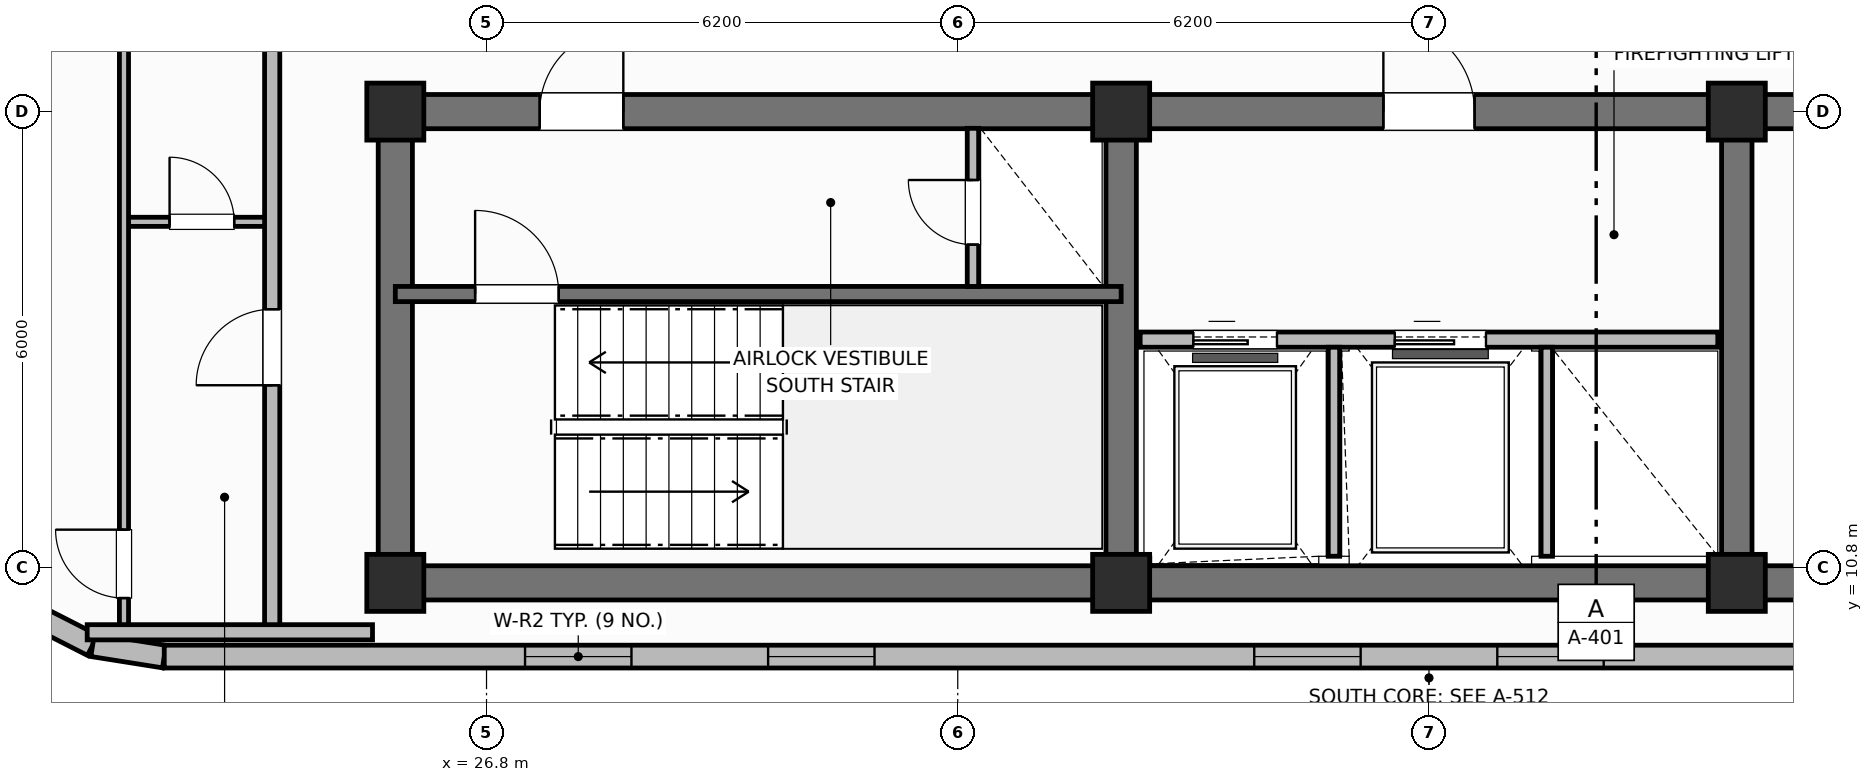
"""IFC4 building model, lengths in metres.
Left out: names, types, materials, properties, quantities, classifications, styles, units other than length and angle.
Written with IfcOpenShell. Run it as: python <this file> out.ifc"""

import sys

from ifc_helpers import new_model, si_unit, direction, frame, frame_2d, origin, origin_2d, place, context, subcontext, project, spatial, rectangle, extrude, element, fill, save


model = new_model("IFC4")
c1 = context("Model", 3, precision=1e-05, world=origin(), true_north=direction((0.0, 1.0)))
c2 = subcontext(c1, "Body", "Model", "MODEL_VIEW")
j1 = project(units=[si_unit("LENGTHUNIT", "METRE"), si_unit("PLANEANGLEUNIT", "RADIAN")], contexts=[c1])
p1 = place(None, origin())
s1 = spatial("IfcSite", under=j1, at=p1, CompositionType="ELEMENT")
p2 = place(p1, origin())
s2 = spatial("IfcBuilding", under=s1, at=p2, CompositionType="ELEMENT")
p3 = place(p2, frame((0.0, 0.0, 286.1)))
s3 = spatial("IfcBuildingStorey", under=s2, at=p3, CompositionType="ELEMENT", Elevation=286.1)
p4 = place(p3, frame((52.8, 10.6, 0.0), z_axis=(0.0, 0.0, 1.0), x_axis=(-1.0, 0.0, 0.0)))
e1 = element("IfcWall", 1, at=p4, inside=s3, PredefinedType="SHEAR", context=c2, shape_type="SweptSolid", body=[
    extrude(rectangle(XDim=27.2, YDim=0.45, at=frame_2d((13.6, 0.0))), origin(), (0.0, 0.0, 1.0), 3.7),
])
p5 = place(p3, frame((25.6, 10.825, 0.0), z_axis=(0.0, 0.0, 1.0), x_axis=(0.0, 1.0, 0.0)))
e2 = element("IfcWall", 2, at=p5, inside=s3, PredefinedType="SHEAR", context=c2, shape_type="SweptSolid", body=[
    extrude(rectangle(XDim=5.75, YDim=0.45, at=frame_2d((2.875, 0.0))), origin(), (0.0, 0.0, 1.0), 3.7),
])
p6 = place(p3, frame((25.6, 16.8, 0.0), z_axis=(0.0, 0.0, 1.0), x_axis=(1.0, 0.0, 0.0)))
e3 = element("IfcWall", 3, at=p6, inside=s3, PredefinedType="SHEAR", context=c2, shape_type="SweptSolid", body=[
    extrude(rectangle(XDim=27.2, YDim=0.45, at=frame_2d((13.6, 0.0))), origin(), (0.0, 0.0, 1.0), 3.7),
])
p7 = place(p6, frame((1.9, 0.0, 0.0)))
e4 = element("IfcOpeningElement", 4, at=p7, cuts=e3, PredefinedType="OPENING", context=c2, shape_type="SweptSolid", body=[
    extrude(rectangle(XDim=1.1, YDim=2.15, at=frame_2d((0.55, 1.075))), frame((0.0, 0.235, 0.0), z_axis=(0.0, -1.0, 0.0), x_axis=(1.0, 0.0, 0.0)), (0.0, 0.0, 1.0), 0.47),
])
p8 = place(p6, frame((13.0, 0.0, 0.0)))
e5 = element("IfcOpeningElement", 5, at=p8, cuts=e3, PredefinedType="OPENING", context=c2, shape_type="SweptSolid", body=[
    extrude(rectangle(XDim=1.2, YDim=2.15, at=frame_2d((0.6, 1.075))), frame((0.0, 0.235, 0.0), z_axis=(0.0, -1.0, 0.0), x_axis=(1.0, 0.0, 0.0)), (0.0, 0.0, 1.0), 0.47),
])
p9 = place(p6, frame((21.6, 0.0, 0.0)))
e6 = element("IfcOpeningElement", 6, at=p9, cuts=e3, PredefinedType="OPENING", context=c2, shape_type="SweptSolid", body=[
    extrude(rectangle(XDim=1.0, YDim=2.15, at=frame_2d((0.5, 1.075))), frame((0.0, 0.235, 0.0), z_axis=(0.0, -1.0, 0.0), x_axis=(1.0, 0.0, 0.0)), (0.0, 0.0, 1.0), 0.47),
])
for number, where, z_axis, x_axis in (
    (7, (35.15, 10.825, 0.0), (0.0, 0.0, 1.0), (0.0, 1.0, 0.0)),
    (8, (43.25, 10.825, 0.0), (0.0, 0.0, 1.0), (0.0, 1.0, 0.0)),
):
    element("IfcWall", number, at=place(p3, frame(where, z_axis=z_axis, x_axis=x_axis)), inside=s3, PredefinedType="SHEAR", context=c2, shape_type="SweptSolid", body=[
        extrude(rectangle(XDim=5.75, YDim=0.4, at=frame_2d((2.875, 0.0))), origin(), (0.0, 0.0, 1.0), 3.7),
    ])
for number, where, z_axis, x_axis in (
    (9, (25.6, 10.6, 0.0), (0.0, 0.0, 1.0), (1.0, 0.0, 0.0)),
    (10, (25.6, 16.8, 0.0), (0.0, 0.0, 1.0), (1.0, 0.0, 0.0)),
    (11, (35.15, 10.6, 0.0), (0.0, 0.0, 1.0), (1.0, 0.0, 0.0)),
    (12, (35.15, 16.8, 0.0), (0.0, 0.0, 1.0), (1.0, 0.0, 0.0)),
    (13, (43.25, 10.6, 0.0), (0.0, 0.0, 1.0), (1.0, 0.0, 0.0)),
    (14, (43.25, 16.8, 0.0), (0.0, 0.0, 1.0), (1.0, 0.0, 0.0)),
):
    element("IfcColumn", number, at=place(p3, frame(where, z_axis=z_axis, x_axis=x_axis)), inside=s3, PredefinedType="COLUMN", context=c2, shape_type="SweptSolid", body=[
        extrude(rectangle(XDim=0.75, YDim=0.75, at=origin_2d()), origin(), (0.0, 0.0, 1.0), 3.7),
    ])
p10 = place(p3, frame((20.767, 10.212, 0.0), z_axis=(0.0, 0.0, 1.0), x_axis=(0.891023873617, -0.45395644796, 0.0)))
e15 = element("IfcWall", 15, at=p10, inside=s3, PredefinedType="SOLIDWALL", context=c2, shape_type="SweptSolid", body=[
    extrude(rectangle(XDim=0.954, YDim=0.3, at=frame_2d((0.477, 0.0))), origin(), (0.0, 0.0, 1.0), 2.73),
])
p11 = place(p3, frame((21.617, 9.779, 0.0), z_axis=(0.0, 0.0, 1.0), x_axis=(0.987669453596, -0.156553666304, 0.0)))
e16 = element("IfcWall", 16, at=p11, inside=s3, PredefinedType="SOLIDWALL", context=c2, shape_type="SweptSolid", body=[
    extrude(rectangle(XDim=0.954, YDim=0.3, at=frame_2d((0.477, 0.0))), origin(), (0.0, 0.0, 1.0), 2.73),
])
p12 = place(p3, frame((22.56, 9.63, 0.0), z_axis=(0.0, 0.0, 1.0), x_axis=(1.0, 0.0, 0.0)))
e17 = element("IfcWall", 17, at=p12, inside=s3, PredefinedType="SOLIDWALL", context=c2, shape_type="SweptSolid", body=[
    extrude(rectangle(XDim=33.28, YDim=0.3, at=frame_2d((16.64, 0.0))), origin(), (0.0, 0.0, 1.0), 2.73),
])
p13 = place(p12, frame((4.747, 0.0, 0.76)))
e18 = element("IfcOpeningElement", 18, at=p13, cuts=e17, PredefinedType="OPENING", context=c2, shape_type="SweptSolid", body=[
    extrude(rectangle(XDim=1.4, YDim=1.85, at=frame_2d((0.7, 0.925))), frame((0.0, 0.16, 0.0), z_axis=(0.0, -1.0, 0.0), x_axis=(1.0, 0.0, 0.0)), (0.0, 0.0, 1.0), 0.32),
])
p14 = place(p12, frame((7.945, 0.0, 0.76)))
e19 = element("IfcOpeningElement", 19, at=p14, cuts=e17, PredefinedType="OPENING", context=c2, shape_type="SweptSolid", body=[
    extrude(rectangle(XDim=1.4, YDim=1.85, at=frame_2d((0.7, 0.925))), frame((0.0, 0.16, 0.0), z_axis=(0.0, -1.0, 0.0), x_axis=(1.0, 0.0, 0.0)), (0.0, 0.0, 1.0), 0.32),
])
p15 = place(p12, frame((14.341, 0.0, 0.76)))
e20 = element("IfcOpeningElement", 20, at=p15, cuts=e17, PredefinedType="OPENING", context=c2, shape_type="SweptSolid", body=[
    extrude(rectangle(XDim=1.4, YDim=1.85, at=frame_2d((0.7, 0.925))), frame((0.0, 0.16, 0.0), z_axis=(0.0, -1.0, 0.0), x_axis=(1.0, 0.0, 0.0)), (0.0, 0.0, 1.0), 0.32),
])
p16 = place(p12, frame((17.539, 0.0, 0.76)))
e21 = element("IfcOpeningElement", 21, at=p16, cuts=e17, PredefinedType="OPENING", context=c2, shape_type="SweptSolid", body=[
    extrude(rectangle(XDim=1.4, YDim=1.85, at=frame_2d((0.7, 0.925))), frame((0.0, 0.16, 0.0), z_axis=(0.0, -1.0, 0.0), x_axis=(1.0, 0.0, 0.0)), (0.0, 0.0, 1.0), 0.32),
])
p17 = place(p12, frame((23.935, 0.0, 0.76)))
e22 = element("IfcOpeningElement", 22, at=p17, cuts=e17, PredefinedType="OPENING", context=c2, shape_type="SweptSolid", body=[
    extrude(rectangle(XDim=1.4, YDim=1.85, at=frame_2d((0.7, 0.925))), frame((0.0, 0.16, 0.0), z_axis=(0.0, -1.0, 0.0), x_axis=(1.0, 0.0, 0.0)), (0.0, 0.0, 1.0), 0.32),
])
p18 = place(p12, frame((27.133, 0.0, 0.76)))
e23 = element("IfcOpeningElement", 23, at=p18, cuts=e17, PredefinedType="OPENING", context=c2, shape_type="SweptSolid", body=[
    extrude(rectangle(XDim=1.4, YDim=1.85, at=frame_2d((0.7, 0.925))), frame((0.0, 0.16, 0.0), z_axis=(0.0, -1.0, 0.0), x_axis=(1.0, 0.0, 0.0)), (0.0, 0.0, 1.0), 0.32),
])
p19 = place(p3, frame((25.6, 14.4, 0.0), z_axis=(0.0, 0.0, 1.0), x_axis=(1.0, 0.0, 0.0)))
e24 = element("IfcWall", 24, at=p19, inside=s3, PredefinedType="SHEAR", context=c2, shape_type="SweptSolid", body=[
    extrude(rectangle(XDim=9.55, YDim=0.2, at=frame_2d((4.775, 0.0))), origin(), (0.0, 0.0, 1.0), 3.7),
])
p20 = place(p19, frame((1.05, 0.0, 0.0)))
e25 = element("IfcOpeningElement", 25, at=p20, cuts=e24, PredefinedType="OPENING", context=c2, shape_type="SweptSolid", body=[
    extrude(rectangle(XDim=1.1, YDim=2.15, at=frame_2d((0.55, 1.075))), frame((0.0, 0.11, 0.0), z_axis=(0.0, -1.0, 0.0), x_axis=(1.0, 0.0, 0.0)), (0.0, 0.0, 1.0), 0.22),
])
p21 = place(p3, frame((33.2, 14.5, 0.0), z_axis=(0.0, 0.0, 1.0), x_axis=(0.0, 1.0, 0.0)))
e26 = element("IfcWall", 26, at=p21, inside=s3, PredefinedType="PARTITIONING", context=c2, shape_type="SweptSolid", body=[
    extrude(rectangle(XDim=2.08, YDim=0.15, at=frame_2d((1.04, 0.0))), origin(), (0.0, 0.0, 1.0), 2.56),
])
p22 = place(p21, frame((0.55, 0.0, 0.0)))
e27 = element("IfcOpeningElement", 27, at=p22, cuts=e26, PredefinedType="OPENING", context=c2, shape_type="SweptSolid", body=[
    extrude(rectangle(XDim=0.85, YDim=2.05, at=frame_2d((0.425, 1.025))), frame((0.0, 0.085, 0.0), z_axis=(0.0, -1.0, 0.0), x_axis=(1.0, 0.0, 0.0)), (0.0, 0.0, 1.0), 0.17),
])
p23 = place(p3, frame((35.4, 13.8, 0.0), z_axis=(0.0, 0.0, 1.0), x_axis=(1.0, 0.0, 0.0)))
e28 = element("IfcWall", 28, at=p23, inside=s3, PredefinedType="PARTITIONING", context=c2, shape_type="SweptSolid", body=[
    extrude(rectangle(XDim=7.6, YDim=0.2, at=frame_2d((3.8, 0.0))), origin(), (0.0, 0.0, 1.0), 2.33),
])
p24 = place(p23, frame((0.7, 0.0, 0.0)))
e29 = element("IfcOpeningElement", 29, at=p24, cuts=e28, PredefinedType="OPENING", context=c2, shape_type="SweptSolid", body=[
    extrude(rectangle(XDim=1.1, YDim=2.15, at=frame_2d((0.55, 1.075))), frame((0.0, 0.11, 0.0), z_axis=(0.0, -1.0, 0.0), x_axis=(1.0, 0.0, 0.0)), (0.0, 0.0, 1.0), 0.22),
])
p25 = place(p23, frame((3.35, 0.0, 0.0)))
e30 = element("IfcOpeningElement", 30, at=p25, cuts=e28, PredefinedType="OPENING", context=c2, shape_type="SweptSolid", body=[
    extrude(rectangle(XDim=1.2, YDim=2.15, at=frame_2d((0.6, 1.075))), frame((0.0, 0.11, 0.0), z_axis=(0.0, -1.0, 0.0), x_axis=(1.0, 0.0, 0.0)), (0.0, 0.0, 1.0), 0.22),
])
for number, where, z_axis, x_axis in (
    (31, (37.95, 10.95, 0.0), (0.0, 0.0, 1.0), (0.0, 1.0, 0.0)),
    (32, (40.75, 10.95, 0.0), (0.0, 0.0, 1.0), (0.0, 1.0, 0.0)),
):
    element("IfcWall", number, at=place(p3, frame(where, z_axis=z_axis, x_axis=x_axis)), inside=s3, PredefinedType="PARTITIONING", context=c2, shape_type="SweptSolid", body=[
        extrude(rectangle(XDim=2.75, YDim=0.15, at=frame_2d((1.375, 0.0))), origin(), (0.0, 0.0, 1.0), 2.56),
    ])
p26 = place(p3, frame((22.03, 15.35, 0.0), z_axis=(0.0, 0.0, 1.0), x_axis=(1.0, 0.0, 0.0)))
e33 = element("IfcWall", 33, at=p26, inside=s3, PredefinedType="PARTITIONING", context=c2, shape_type="SweptSolid", body=[
    extrude(rectangle(XDim=1.95, YDim=0.12, at=frame_2d((0.975, 0.0))), origin(), (0.0, 0.0, 1.0), 2.56),
])
p27 = place(p26, frame((0.6, 0.0, 0.0)))
e34 = element("IfcOpeningElement", 34, at=p27, cuts=e33, PredefinedType="OPENING", context=c2, shape_type="SweptSolid", body=[
    extrude(rectangle(XDim=0.85, YDim=2.1, at=frame_2d((0.425, 1.05))), frame((0.0, 0.07, 0.0), z_axis=(0.0, -1.0, 0.0), x_axis=(1.0, 0.0, 0.0)), (0.0, 0.0, 1.0), 0.14),
])
p28 = place(p3, frame((22.03, 9.99, 0.0), z_axis=(0.0, 0.0, 1.0), x_axis=(0.0, 1.0, 0.0)))
e35 = element("IfcWall", 35, at=p28, inside=s3, PredefinedType="PARTITIONING", context=c2, shape_type="SweptSolid", body=[
    extrude(rectangle(XDim=12.67, YDim=0.12, at=frame_2d((6.335, 0.0))), origin(), (0.0, 0.0, 1.0), 2.56),
])
p29 = place(p28, frame((0.41, 0.0, 0.0)))
e36 = element("IfcOpeningElement", 36, at=p29, cuts=e35, PredefinedType="OPENING", context=c2, shape_type="SweptSolid", body=[
    extrude(rectangle(XDim=0.9, YDim=2.1, at=frame_2d((0.45, 1.05))), frame((0.0, 0.07, 0.0), z_axis=(0.0, -1.0, 0.0), x_axis=(1.0, 0.0, 0.0)), (0.0, 0.0, 1.0), 0.14),
])
p30 = place(p28, frame((10.51, 0.0, 0.0)))
e37 = element("IfcOpeningElement", 37, at=p30, cuts=e35, PredefinedType="OPENING", context=c2, shape_type="SweptSolid", body=[
    extrude(rectangle(XDim=0.82, YDim=2.08, at=frame_2d((0.41, 1.04))), frame((0.0, 0.07, 0.0), z_axis=(0.0, -1.0, 0.0), x_axis=(1.0, 0.0, 0.0)), (0.0, 0.0, 1.0), 0.14),
])
p31 = place(p3, frame((23.98, 9.95, 0.0), z_axis=(0.0, 0.0, 1.0), x_axis=(0.0, 1.0, 0.0)))
e38 = element("IfcWall", 38, at=p31, inside=s3, PredefinedType="PARTITIONING", context=c2, shape_type="SweptSolid", body=[
    extrude(rectangle(XDim=36.5, YDim=0.2, at=frame_2d((18.25, 0.0))), origin(), (0.0, 0.0, 1.0), 2.56),
])
p32 = place(p31, frame((3.25, 0.0, 0.0)))
e39 = element("IfcOpeningElement", 39, at=p32, cuts=e38, PredefinedType="OPENING", context=c2, shape_type="SweptSolid", body=[
    extrude(rectangle(XDim=1.0, YDim=2.15, at=frame_2d((0.5, 1.075))), frame((0.0, 0.11, 0.0), z_axis=(0.0, -1.0, 0.0), x_axis=(1.0, 0.0, 0.0)), (0.0, 0.0, 1.0), 0.22),
])
p33 = place(p31, frame((13.3, 0.0, 0.0)))
e40 = element("IfcOpeningElement", 40, at=p33, cuts=e38, PredefinedType="OPENING", context=c2, shape_type="SweptSolid", body=[
    extrude(rectangle(XDim=1.0, YDim=2.15, at=frame_2d((0.5, 1.075))), frame((0.0, 0.11, 0.0), z_axis=(0.0, -1.0, 0.0), x_axis=(1.0, 0.0, 0.0)), (0.0, 0.0, 1.0), 0.22),
])
p34 = place(p31, frame((25.005, 0.0, 0.0)))
e41 = element("IfcOpeningElement", 41, at=p34, cuts=e38, PredefinedType="OPENING", context=c2, shape_type="SweptSolid", body=[
    extrude(rectangle(XDim=1.0, YDim=2.15, at=frame_2d((0.5, 1.075))), frame((0.0, 0.11, 0.0), z_axis=(0.0, -1.0, 0.0), x_axis=(1.0, 0.0, 0.0)), (0.0, 0.0, 1.0), 0.22),
])
p35 = place(p3, frame((21.546, 9.95, 0.0), z_axis=(0.0, 0.0, 1.0), x_axis=(1.0, 0.0, 0.0)))
e42 = element("IfcWall", 42, at=p35, inside=s3, PredefinedType="PARTITIONING", context=c2, shape_type="SweptSolid", body=[
    extrude(rectangle(XDim=3.754, YDim=0.2, at=frame_2d((1.877, 0.0))), origin(), (0.0, 0.0, 1.0), 2.56),
])
p36 = place(p13, origin())
e43 = element("IfcWindow", 43, at=p36, inside=s3, PartitioningType="SINGLE_PANEL", PredefinedType="WINDOW", context=c2, shape_type="SweptSolid", body=[
    extrude(rectangle(XDim=1.4, YDim=1.85, at=frame_2d((0.7, 0.925))), frame((0.0, 0.03, 0.0), z_axis=(0.0, -1.0, 0.0), x_axis=(1.0, 0.0, 0.0)), (0.0, 0.0, 1.0), 0.06),
])
fill(e18, e43)
p37 = place(p14, origin())
e44 = element("IfcWindow", 44, at=p37, inside=s3, PartitioningType="SINGLE_PANEL", PredefinedType="WINDOW", context=c2, shape_type="SweptSolid", body=[
    extrude(rectangle(XDim=1.4, YDim=1.85, at=frame_2d((0.7, 0.925))), frame((0.0, 0.03, 0.0), z_axis=(0.0, -1.0, 0.0), x_axis=(1.0, 0.0, 0.0)), (0.0, 0.0, 1.0), 0.06),
])
fill(e19, e44)
p38 = place(p15, origin())
e45 = element("IfcWindow", 45, at=p38, inside=s3, PartitioningType="SINGLE_PANEL", PredefinedType="WINDOW", context=c2, shape_type="SweptSolid", body=[
    extrude(rectangle(XDim=1.4, YDim=1.85, at=frame_2d((0.7, 0.925))), frame((0.0, 0.03, 0.0), z_axis=(0.0, -1.0, 0.0), x_axis=(1.0, 0.0, 0.0)), (0.0, 0.0, 1.0), 0.06),
])
fill(e20, e45)
p39 = place(p16, origin())
e46 = element("IfcWindow", 46, at=p39, inside=s3, PartitioningType="SINGLE_PANEL", PredefinedType="WINDOW", context=c2, shape_type="SweptSolid", body=[
    extrude(rectangle(XDim=1.4, YDim=1.85, at=frame_2d((0.7, 0.925))), frame((0.0, 0.03, 0.0), z_axis=(0.0, -1.0, 0.0), x_axis=(1.0, 0.0, 0.0)), (0.0, 0.0, 1.0), 0.06),
])
fill(e21, e46)
p40 = place(p20, origin())
e47 = element("IfcDoor", 47, at=p40, inside=s3, OperationType="SINGLE_SWING_LEFT", PredefinedType="DOOR", context=c2, shape_type="SweptSolid", body=[
    extrude(rectangle(XDim=1.1, YDim=2.15, at=frame_2d((0.55, 1.075))), frame((0.0, 0.025, 0.0), z_axis=(0.0, -1.0, 0.0), x_axis=(1.0, 0.0, 0.0)), (0.0, 0.0, 1.0), 0.05),
])
fill(e25, e47)
p41 = place(p22, origin())
e48 = element("IfcDoor", 48, at=p41, inside=s3, OperationType="SINGLE_SWING_RIGHT", PredefinedType="TRAPDOOR", context=c2, shape_type="SweptSolid", body=[
    extrude(rectangle(XDim=0.85, YDim=2.05, at=frame_2d((0.425, 1.025))), frame((0.0, 0.025, 0.0), z_axis=(0.0, -1.0, 0.0), x_axis=(1.0, 0.0, 0.0)), (0.0, 0.0, 1.0), 0.05),
])
fill(e27, e48)
p42 = place(p24, origin())
e49 = element("IfcDoor", 49, at=p42, inside=s3, OperationType="SLIDING_TO_LEFT", PredefinedType="DOOR", context=c2, shape_type="SweptSolid", body=[
    extrude(rectangle(XDim=1.1, YDim=2.15, at=frame_2d((0.55, 1.075))), frame((0.0, 0.025, 0.0), z_axis=(0.0, -1.0, 0.0), x_axis=(1.0, 0.0, 0.0)), (0.0, 0.0, 1.0), 0.05),
])
fill(e29, e49)
p43 = place(p25, origin())
e50 = element("IfcDoor", 50, at=p43, inside=s3, OperationType="SLIDING_TO_LEFT", PredefinedType="DOOR", context=c2, shape_type="SweptSolid", body=[
    extrude(rectangle(XDim=1.2, YDim=2.15, at=frame_2d((0.6, 1.075))), frame((0.0, 0.025, 0.0), z_axis=(0.0, -1.0, 0.0), x_axis=(1.0, 0.0, 0.0)), (0.0, 0.0, 1.0), 0.05),
])
fill(e30, e50)
p44 = place(p27, origin())
e51 = element("IfcDoor", 51, at=p44, inside=s3, OperationType="SINGLE_SWING_LEFT", PredefinedType="DOOR", context=c2, shape_type="SweptSolid", body=[
    extrude(rectangle(XDim=0.85, YDim=2.1, at=frame_2d((0.425, 1.05))), frame((0.0, 0.025, 0.0), z_axis=(0.0, -1.0, 0.0), x_axis=(1.0, 0.0, 0.0)), (0.0, 0.0, 1.0), 0.05),
])
fill(e34, e51)
p45 = place(p29, origin())
e52 = element("IfcDoor", 52, at=p45, inside=s3, OperationType="SINGLE_SWING_RIGHT", PredefinedType="DOOR", context=c2, shape_type="SweptSolid", body=[
    extrude(rectangle(XDim=0.9, YDim=2.1, at=frame_2d((0.45, 1.05))), frame((0.0, 0.025, 0.0), z_axis=(0.0, -1.0, 0.0), x_axis=(1.0, 0.0, 0.0)), (0.0, 0.0, 1.0), 0.05),
])
fill(e36, e52)
p46 = place(p32, origin())
e53 = element("IfcDoor", 53, at=p46, inside=s3, OperationType="SINGLE_SWING_LEFT", PredefinedType="DOOR", context=c2, shape_type="SweptSolid", body=[
    extrude(rectangle(XDim=1.0, YDim=2.15, at=frame_2d((0.5, 1.075))), frame((0.0, 0.025, 0.0), z_axis=(0.0, -1.0, 0.0), x_axis=(1.0, 0.0, 0.0)), (0.0, 0.0, 1.0), 0.05),
])
fill(e39, e53)
p47 = place(p7, origin())
e54 = element("IfcDoor", 54, at=p47, inside=s3, OperationType="SINGLE_SWING_RIGHT", PredefinedType="DOOR", context=c2, shape_type="SweptSolid", body=[
    extrude(rectangle(XDim=1.1, YDim=2.15, at=frame_2d((0.55, 1.075))), frame((0.0, 0.025, 0.0), z_axis=(0.0, -1.0, 0.0), x_axis=(1.0, 0.0, 0.0)), (0.0, 0.0, 1.0), 0.05),
])
fill(e4, e54)
p48 = place(p8, origin())
e55 = element("IfcDoor", 55, at=p48, inside=s3, OperationType="SINGLE_SWING_LEFT", PredefinedType="DOOR", context=c2, shape_type="SweptSolid", body=[
    extrude(rectangle(XDim=1.2, YDim=2.15, at=frame_2d((0.6, 1.075))), frame((0.0, 0.025, 0.0), z_axis=(0.0, -1.0, 0.0), x_axis=(1.0, 0.0, 0.0)), (0.0, 0.0, 1.0), 0.05),
])
fill(e5, e55)
save(model, sys.argv[1])
